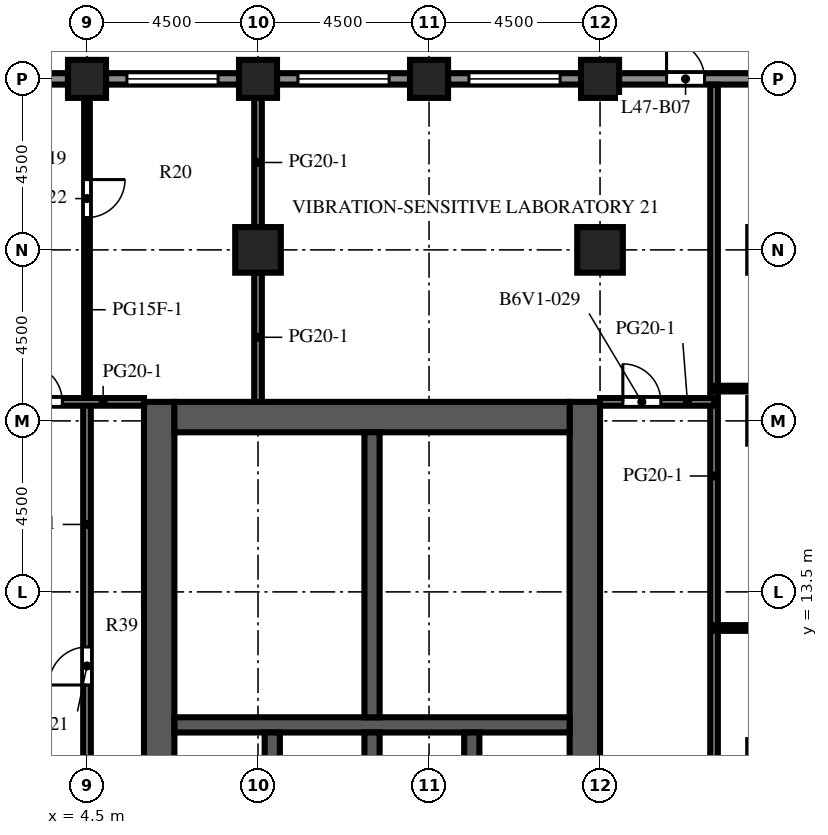
"""IFC4 building model, lengths in metres.
Left out: names, types, materials, properties, quantities, classifications, styles, units other than length and angle.
Written with IfcOpenShell. Run it as: python <this file> out.ifc"""

import sys

from ifc_helpers import new_model, si_unit, direction, frame, frame_2d, origin, origin_2d, place, context, subcontext, project, spatial, rectangle, extrude, element, fill, save


model = new_model("IFC4")
c1 = context("Model", 3, precision=1e-05, world=origin(), true_north=direction((0.0, 1.0)))
c2 = subcontext(c1, "Body", "Model", "MODEL_VIEW")
j1 = project(units=[si_unit("LENGTHUNIT", "METRE"), si_unit("PLANEANGLEUNIT", "RADIAN")], contexts=[c1])
p1 = place(None, origin())
s1 = spatial("IfcSite", under=j1, at=p1, CompositionType="ELEMENT")
p2 = place(p1, origin())
s2 = spatial("IfcBuilding", under=s1, at=p2, CompositionType="ELEMENT")
p3 = place(p2, frame((0.0, 0.0, 207.9)))
s3 = spatial("IfcBuildingStorey", under=s2, at=p3, CompositionType="ELEMENT", Elevation=207.9)
for number, where, z_axis, x_axis in (
    (1, (4.5, 27.0, 0.0), (0.0, 0.0, 1.0), (1.0, 0.0, 0.0)),
    (2, (9.0, 27.0, 0.0), (0.0, 0.0, 1.0), (1.0, 0.0, 0.0)),
    (3, (13.5, 27.0, 0.0), (0.0, 0.0, 1.0), (1.0, 0.0, 0.0)),
    (4, (18.0, 27.0, 0.0), (0.0, 0.0, 1.0), (1.0, 0.0, 0.0)),
):
    element("IfcColumn", number, at=place(p3, frame(where, z_axis=z_axis, x_axis=x_axis)), inside=s3, PredefinedType="COLUMN", context=c2, shape_type="SweptSolid", body=[
        extrude(rectangle(XDim=1.0, YDim=1.0, at=origin_2d()), origin(), (0.0, 0.0, 1.0), 4.1),
    ])
for number, where, z_axis, x_axis in (
    (5, (9.0, 22.5, 0.0), (0.0, 0.0, 1.0), (1.0, 0.0, 0.0)),
    (6, (18.0, 22.5, 0.0), (0.0, 0.0, 1.0), (1.0, 0.0, 0.0)),
):
    element("IfcColumn", number, at=place(p3, frame(where, z_axis=z_axis, x_axis=x_axis)), inside=s3, PredefinedType="COLUMN", context=c2, shape_type="SweptSolid", body=[
        extrude(rectangle(XDim=1.2, YDim=1.2, at=origin_2d()), origin(), (0.0, 0.0, 1.0), 4.1),
    ])
p4 = place(p3, frame((6.4, -9.0, 0.0), z_axis=(0.0, 0.0, 1.0), x_axis=(0.0, 1.0, 0.0)))
e7 = element("IfcWall", 7, at=p4, inside=s3, PredefinedType="SHEAR", context=c2, shape_type="SweptSolid", body=[
    extrude(rectangle(XDim=27.5, YDim=0.8, at=frame_2d((13.75, 0.0))), origin(), (0.0, 0.0, 1.0), 4.1),
])
p5 = place(p4, frame((12.55, 0.0, 0.0)))
e8 = element("IfcOpeningElement", 8, at=p5, cuts=e7, PredefinedType="OPENING", context=c2, shape_type="SweptSolid", body=[
    extrude(rectangle(XDim=2.4, YDim=2.4, at=frame_2d((1.2, 1.2))), frame((0.0, 0.41, 0.0), z_axis=(0.0, -1.0, 0.0), x_axis=(1.0, 0.0, 0.0)), (0.0, 0.0, 1.0), 0.82),
])
p6 = place(p4, frame((3.95, 0.0, 0.0)))
e9 = element("IfcOpeningElement", 9, at=p6, cuts=e7, PredefinedType="OPENING", context=c2, shape_type="SweptSolid", body=[
    extrude(rectangle(XDim=1.2, YDim=2.1, at=frame_2d((0.6, 1.05))), frame((0.0, 0.41, 0.0), z_axis=(0.0, -1.0, 0.0), x_axis=(1.0, 0.0, 0.0)), (0.0, 0.0, 1.0), 0.82),
])
p7 = place(p4, frame((22.35, 0.0, 0.0)))
e10 = element("IfcOpeningElement", 10, at=p7, cuts=e7, PredefinedType="OPENING", context=c2, shape_type="SweptSolid", body=[
    extrude(rectangle(XDim=1.2, YDim=2.1, at=frame_2d((0.6, 1.05))), frame((0.0, 0.41, 0.0), z_axis=(0.0, -1.0, 0.0), x_axis=(1.0, 0.0, 0.0)), (0.0, 0.0, 1.0), 0.82),
])
p8 = place(p3, frame((17.6, -9.0, 0.0), z_axis=(0.0, 0.0, 1.0), x_axis=(0.0, 1.0, 0.0)))
e11 = element("IfcWall", 11, at=p8, inside=s3, PredefinedType="SHEAR", context=c2, shape_type="SweptSolid", body=[
    extrude(rectangle(XDim=27.5, YDim=0.8, at=frame_2d((13.75, 0.0))), origin(), (0.0, 0.0, 1.0), 4.1),
])
p9 = place(p8, frame((12.55, 0.0, 0.0)))
e12 = element("IfcOpeningElement", 12, at=p9, cuts=e11, PredefinedType="OPENING", context=c2, shape_type="SweptSolid", body=[
    extrude(rectangle(XDim=2.4, YDim=2.4, at=frame_2d((1.2, 1.2))), frame((0.0, 0.41, 0.0), z_axis=(0.0, -1.0, 0.0), x_axis=(1.0, 0.0, 0.0)), (0.0, 0.0, 1.0), 0.82),
])
p10 = place(p8, frame((6.825, 0.0, 0.0)))
e13 = element("IfcOpeningElement", 13, at=p10, cuts=e11, PredefinedType="OPENING", context=c2, shape_type="SweptSolid", body=[
    extrude(rectangle(XDim=1.2, YDim=2.1, at=frame_2d((0.6, 1.05))), frame((0.0, 0.41, 0.0), z_axis=(0.0, -1.0, 0.0), x_axis=(1.0, 0.0, 0.0)), (0.0, 0.0, 1.0), 0.82),
])
p11 = place(p8, frame((19.475, 0.0, 0.0)))
e14 = element("IfcOpeningElement", 14, at=p11, cuts=e11, PredefinedType="OPENING", context=c2, shape_type="SweptSolid", body=[
    extrude(rectangle(XDim=1.2, YDim=2.1, at=frame_2d((0.6, 1.05))), frame((0.0, 0.41, 0.0), z_axis=(0.0, -1.0, 0.0), x_axis=(1.0, 0.0, 0.0)), (0.0, 0.0, 1.0), 0.82),
])
p12 = place(p3, frame((6.8, 18.1, 0.0), z_axis=(0.0, 0.0, 1.0), x_axis=(1.0, 0.0, 0.0)))
e15 = element("IfcWall", 15, at=p12, inside=s3, PredefinedType="SHEAR", context=c2, shape_type="SweptSolid", body=[
    extrude(rectangle(XDim=10.4, YDim=0.8, at=frame_2d((5.2, 0.0))), origin(), (0.0, 0.0, 1.0), 4.1),
])
p13 = place(p3, frame((6.8, 10.0, 0.0), z_axis=(0.0, 0.0, 1.0), x_axis=(1.0, 0.0, 0.0)))
e16 = element("IfcWall", 16, at=p13, inside=s3, PredefinedType="SHEAR", context=c2, shape_type="SweptSolid", body=[
    extrude(rectangle(XDim=10.4, YDim=0.4, at=frame_2d((5.2, 0.0))), origin(), (0.0, 0.0, 1.0), 4.1),
])
for number, where, z_axis, x_axis in (
    (17, (9.375, 6.9, 0.0), (0.0, 0.0, 1.0), (0.0, 1.0, 0.0)),
    (18, (12.0, 6.9, 0.0), (0.0, 0.0, 1.0), (0.0, 1.0, 0.0)),
    (19, (14.625, 6.9, 0.0), (0.0, 0.0, 1.0), (0.0, 1.0, 0.0)),
):
    element("IfcWall", number, at=place(p3, frame(where, z_axis=z_axis, x_axis=x_axis)), inside=s3, PredefinedType="SHEAR", context=c2, shape_type="SweptSolid", body=[
        extrude(rectangle(XDim=2.9, YDim=0.4, at=frame_2d((1.45, 0.0))), origin(), (0.0, 0.0, 1.0), 4.1),
    ])
p14 = place(p3, frame((12.0, 10.2, 0.0), z_axis=(0.0, 0.0, 1.0), x_axis=(0.0, 1.0, 0.0)))
e20 = element("IfcWall", 20, at=p14, inside=s3, PredefinedType="SHEAR", context=c2, shape_type="SweptSolid", body=[
    extrude(rectangle(XDim=7.5, YDim=0.4, at=frame_2d((3.75, 0.0))), origin(), (0.0, 0.0, 1.0), 4.1),
])
p15 = place(p3, frame((18.5, 27.0, 0.0), z_axis=(0.0, 0.0, 1.0), x_axis=(1.0, 0.0, 0.0)))
e21 = element("IfcWall", 21, at=p15, inside=s3, PredefinedType="SOLIDWALL", context=c2, shape_type="SweptSolid", body=[
    extrude(rectangle(XDim=3.5, YDim=0.3, at=frame_2d((1.75, 0.0))), origin(), (0.0, 0.0, 1.0), 2.85),
])
p16 = place(p15, frame((1.25, 0.0, 0.0)))
e22 = element("IfcOpeningElement", 22, at=p16, cuts=e21, PredefinedType="OPENING", context=c2, shape_type="SweptSolid", body=[
    extrude(rectangle(XDim=1.0, YDim=2.2, at=frame_2d((0.5, 1.1))), frame((0.0, 0.16, 0.0), z_axis=(0.0, -1.0, 0.0), x_axis=(1.0, 0.0, 0.0)), (0.0, 0.0, 1.0), 0.32),
])
p17 = place(p3, frame((14.0, 27.0, 0.0), z_axis=(0.0, 0.0, 1.0), x_axis=(1.0, 0.0, 0.0)))
e23 = element("IfcWall", 23, at=p17, inside=s3, PredefinedType="SOLIDWALL", context=c2, shape_type="SweptSolid", body=[
    extrude(rectangle(XDim=3.5, YDim=0.3, at=frame_2d((1.75, 0.0))), origin(), (0.0, 0.0, 1.0), 2.85),
])
p18 = place(p17, frame((0.55, 0.0, 0.8)))
e24 = element("IfcOpeningElement", 24, at=p18, cuts=e23, PredefinedType="OPENING", context=c2, shape_type="SweptSolid", body=[
    extrude(rectangle(XDim=2.4, YDim=1.7, at=frame_2d((1.2, 0.85))), frame((0.0, 0.16, 0.0), z_axis=(0.0, -1.0, 0.0), x_axis=(1.0, 0.0, 0.0)), (0.0, 0.0, 1.0), 0.32),
])
p19 = place(p3, frame((9.5, 27.0, 0.0), z_axis=(0.0, 0.0, 1.0), x_axis=(1.0, 0.0, 0.0)))
e25 = element("IfcWall", 25, at=p19, inside=s3, PredefinedType="SOLIDWALL", context=c2, shape_type="SweptSolid", body=[
    extrude(rectangle(XDim=3.5, YDim=0.3, at=frame_2d((1.75, 0.0))), origin(), (0.0, 0.0, 1.0), 2.85),
])
p20 = place(p19, frame((0.55, 0.0, 0.8)))
e26 = element("IfcOpeningElement", 26, at=p20, cuts=e25, PredefinedType="OPENING", context=c2, shape_type="SweptSolid", body=[
    extrude(rectangle(XDim=2.4, YDim=1.7, at=frame_2d((1.2, 0.85))), frame((0.0, 0.16, 0.0), z_axis=(0.0, -1.0, 0.0), x_axis=(1.0, 0.0, 0.0)), (0.0, 0.0, 1.0), 0.32),
])
p21 = place(p3, frame((5.0, 27.0, 0.0), z_axis=(0.0, 0.0, 1.0), x_axis=(1.0, 0.0, 0.0)))
e27 = element("IfcWall", 27, at=p21, inside=s3, PredefinedType="SOLIDWALL", context=c2, shape_type="SweptSolid", body=[
    extrude(rectangle(XDim=3.5, YDim=0.3, at=frame_2d((1.75, 0.0))), origin(), (0.0, 0.0, 1.0), 2.85),
])
p22 = place(p21, frame((0.55, 0.0, 0.8)))
e28 = element("IfcOpeningElement", 28, at=p22, cuts=e27, PredefinedType="OPENING", context=c2, shape_type="SweptSolid", body=[
    extrude(rectangle(XDim=2.4, YDim=1.7, at=frame_2d((1.2, 0.85))), frame((0.0, 0.16, 0.0), z_axis=(0.0, -1.0, 0.0), x_axis=(1.0, 0.0, 0.0)), (0.0, 0.0, 1.0), 0.32),
])
p23 = place(p3, frame((0.5, 27.0, 0.0), z_axis=(0.0, 0.0, 1.0), x_axis=(1.0, 0.0, 0.0)))
e29 = element("IfcWall", 29, at=p23, inside=s3, PredefinedType="SOLIDWALL", context=c2, shape_type="SweptSolid", body=[
    extrude(rectangle(XDim=3.5, YDim=0.3, at=frame_2d((1.75, 0.0))), origin(), (0.0, 0.0, 1.0), 2.85),
])
p24 = place(p23, frame((0.55, 0.0, 0.8)))
e30 = element("IfcOpeningElement", 30, at=p24, cuts=e29, PredefinedType="OPENING", context=c2, shape_type="SweptSolid", body=[
    extrude(rectangle(XDim=2.4, YDim=1.7, at=frame_2d((1.2, 0.85))), frame((0.0, 0.16, 0.0), z_axis=(0.0, -1.0, 0.0), x_axis=(1.0, 0.0, 0.0)), (0.0, 0.0, 1.0), 0.32),
])
p25 = place(p3, frame((8.2, 10.2, 0.0), z_axis=(0.0, 0.0, 1.0), x_axis=(0.0, 1.0, 0.0)))
e31 = element("IfcWall", 31, at=p25, inside=s3, PredefinedType="PARTITIONING", context=c2, shape_type="SweptSolid", body=[
    extrude(rectangle(XDim=2.25, YDim=0.1, at=frame_2d((1.125, 0.0))), origin(), (0.0, 0.0, 1.0), 3.65),
])
p26 = place(p25, frame((0.625, 0.0, 0.0)))
e32 = element("IfcOpeningElement", 32, at=p26, cuts=e31, PredefinedType="OPENING", context=c2, shape_type="SweptSolid", body=[
    extrude(rectangle(XDim=1.0, YDim=2.1, at=frame_2d((0.5, 1.05))), frame((0.0, 0.06, 0.0), z_axis=(0.0, -1.0, 0.0), x_axis=(1.0, 0.0, 0.0)), (0.0, 0.0, 1.0), 0.12),
])
p27 = place(p3, frame((8.2, 12.45, 0.0), z_axis=(0.0, 0.0, 1.0), x_axis=(0.0, 1.0, 0.0)))
e33 = element("IfcWall", 33, at=p27, inside=s3, PredefinedType="PARTITIONING", context=c2, shape_type="SweptSolid", body=[
    extrude(rectangle(XDim=2.4, YDim=0.1, at=frame_2d((1.2, 0.0))), origin(), (0.0, 0.0, 1.0), 3.65),
])
p28 = place(p27, frame((0.7, 0.0, 0.0)))
e34 = element("IfcOpeningElement", 34, at=p28, cuts=e33, PredefinedType="OPENING", context=c2, shape_type="SweptSolid", body=[
    extrude(rectangle(XDim=1.0, YDim=2.1, at=frame_2d((0.5, 1.05))), frame((0.0, 0.06, 0.0), z_axis=(0.0, -1.0, 0.0), x_axis=(1.0, 0.0, 0.0)), (0.0, 0.0, 1.0), 0.12),
])
p29 = place(p3, frame((8.2, 14.85, 0.0), z_axis=(0.0, 0.0, 1.0), x_axis=(0.0, 1.0, 0.0)))
e35 = element("IfcWall", 35, at=p29, inside=s3, PredefinedType="PARTITIONING", context=c2, shape_type="SweptSolid", body=[
    extrude(rectangle(XDim=2.85, YDim=0.1, at=frame_2d((1.425, 0.0))), origin(), (0.0, 0.0, 1.0), 3.65),
])
p30 = place(p29, frame((0.925, 0.0, 0.0)))
e36 = element("IfcOpeningElement", 36, at=p30, cuts=e35, PredefinedType="OPENING", context=c2, shape_type="SweptSolid", body=[
    extrude(rectangle(XDim=1.0, YDim=2.1, at=frame_2d((0.5, 1.05))), frame((0.0, 0.06, 0.0), z_axis=(0.0, -1.0, 0.0), x_axis=(1.0, 0.0, 0.0)), (0.0, 0.0, 1.0), 0.12),
])
for number, where, z_axis, x_axis in (
    (37, (8.2, 12.45, 0.0), (0.0, 0.0, 1.0), (1.0, 0.0, 0.0)),
    (38, (8.2, 14.85, 0.0), (0.0, 0.0, 1.0), (1.0, 0.0, 0.0)),
):
    element("IfcWall", number, at=place(p3, frame(where, z_axis=z_axis, x_axis=x_axis)), inside=s3, PredefinedType="PARTITIONING", context=c2, shape_type="SweptSolid", body=[
        extrude(rectangle(XDim=3.6, YDim=0.1, at=frame_2d((1.8, 0.0))), origin(), (0.0, 0.0, 1.0), 3.65),
    ])
p31 = place(p3, frame((4.5, 26.5, 0.0), z_axis=(0.0, 0.0, 1.0), x_axis=(0.0, -1.0, 0.0)))
e39 = element("IfcWall", 39, at=p31, inside=s3, PredefinedType="PARTITIONING", context=c2, shape_type="SweptSolid", body=[
    extrude(rectangle(XDim=8.0, YDim=0.15, at=frame_2d((4.0, 0.0))), origin(), (0.0, 0.0, 1.0), 3.65),
])
p32 = place(p31, frame((2.15, 0.0, 0.0)))
e40 = element("IfcOpeningElement", 40, at=p32, cuts=e39, PredefinedType="OPENING", context=c2, shape_type="SweptSolid", body=[
    extrude(rectangle(XDim=1.0, YDim=2.1, at=frame_2d((0.5, 1.05))), frame((0.0, 0.085, 0.0), z_axis=(0.0, -1.0, 0.0), x_axis=(1.0, 0.0, 0.0)), (0.0, 0.0, 1.0), 0.17),
])
p33 = place(p3, frame((4.5, 18.5, 0.0), z_axis=(0.0, 0.0, 1.0), x_axis=(0.0, -1.0, 0.0)))
e41 = element("IfcWall", 41, at=p33, inside=s3, PredefinedType="PARTITIONING", context=c2, shape_type="SweptSolid", body=[
    extrude(rectangle(XDim=11.8, YDim=0.2, at=frame_2d((5.9, 0.0))), origin(), (0.0, 0.0, 1.0), 3.65),
])
p34 = place(p33, frame((6.45, 0.0, 0.0)))
e42 = element("IfcOpeningElement", 42, at=p34, cuts=e41, PredefinedType="OPENING", context=c2, shape_type="SweptSolid", body=[
    extrude(rectangle(XDim=1.0, YDim=2.1, at=frame_2d((0.5, 1.05))), frame((0.0, 0.11, 0.0), z_axis=(0.0, -1.0, 0.0), x_axis=(1.0, 0.0, 0.0)), (0.0, 0.0, 1.0), 0.22),
])
for number, where, z_axis, x_axis in (
    (43, (9.0, 18.5, 0.0), (0.0, 0.0, 1.0), (0.0, 1.0, 0.0)),
    (44, (9.0, 23.1, 0.0), (0.0, 0.0, 1.0), (0.0, 1.0, 0.0)),
):
    element("IfcWall", number, at=place(p3, frame(where, z_axis=z_axis, x_axis=x_axis)), inside=s3, PredefinedType="PARTITIONING", context=c2, shape_type="SweptSolid", body=[
        extrude(rectangle(XDim=3.4, YDim=0.2, at=frame_2d((1.7, 0.0))), origin(), (0.0, 0.0, 1.0), 3.65),
    ])
p35 = place(p3, frame((21.0, 6.25, 0.0), z_axis=(0.0, 0.0, 1.0), x_axis=(0.0, 1.0, 0.0)))
e45 = element("IfcWall", 45, at=p35, inside=s3, PredefinedType="PARTITIONING", context=c2, shape_type="SweptSolid", body=[
    extrude(rectangle(XDim=20.6, YDim=0.2, at=frame_2d((10.3, 0.0))), origin(), (0.0, 0.0, 1.0), 3.65),
])
p36 = place(p3, frame((21.0, 12.55, 0.0), z_axis=(0.0, 0.0, 1.0), x_axis=(1.0, 0.0, 0.0)))
e46 = element("IfcWall", 46, at=p36, inside=s3, PredefinedType="PARTITIONING", context=c2, shape_type="SweptSolid", body=[
    extrude(rectangle(XDim=10.35, YDim=0.15, at=frame_2d((5.175, 0.0))), origin(), (0.0, 0.0, 1.0), 3.65),
])
p37 = place(p36, frame((4.6, 0.0, 0.0)))
e47 = element("IfcOpeningElement", 47, at=p37, cuts=e46, PredefinedType="OPENING", context=c2, shape_type="SweptSolid", body=[
    extrude(rectangle(XDim=1.0, YDim=2.1, at=frame_2d((0.5, 1.05))), frame((0.0, 0.085, 0.0), z_axis=(0.0, -1.0, 0.0), x_axis=(1.0, 0.0, 0.0)), (0.0, 0.0, 1.0), 0.17),
])
p38 = place(p3, frame((1.5, 18.5, 0.0), z_axis=(0.0, 0.0, 1.0), x_axis=(1.0, 0.0, 0.0)))
e48 = element("IfcWall", 48, at=p38, inside=s3, PredefinedType="PARTITIONING", context=c2, shape_type="SweptSolid", body=[
    extrude(rectangle(XDim=4.5, YDim=0.2, at=frame_2d((2.25, 0.0))), origin(), (0.0, 0.0, 1.0), 3.65),
])
p39 = place(p38, frame((1.35, 0.0, 0.0)))
e49 = element("IfcOpeningElement", 49, at=p39, cuts=e48, PredefinedType="OPENING", context=c2, shape_type="SweptSolid", body=[
    extrude(rectangle(XDim=1.0, YDim=2.1, at=frame_2d((0.5, 1.05))), frame((0.0, 0.11, 0.0), z_axis=(0.0, -1.0, 0.0), x_axis=(1.0, 0.0, 0.0)), (0.0, 0.0, 1.0), 0.22),
])
p40 = place(p3, frame((18.0, 18.5, 0.0), z_axis=(0.0, 0.0, 1.0), x_axis=(1.0, 0.0, 0.0)))
e50 = element("IfcWall", 50, at=p40, inside=s3, PredefinedType="PARTITIONING", context=c2, shape_type="SweptSolid", body=[
    extrude(rectangle(XDim=3.0, YDim=0.2, at=frame_2d((1.5, 0.0))), origin(), (0.0, 0.0, 1.0), 3.65),
])
p41 = place(p40, frame((0.6, 0.0, 0.0)))
e51 = element("IfcOpeningElement", 51, at=p41, cuts=e50, PredefinedType="OPENING", context=c2, shape_type="SweptSolid", body=[
    extrude(rectangle(XDim=1.0, YDim=2.1, at=frame_2d((0.5, 1.05))), frame((0.0, 0.11, 0.0), z_axis=(0.0, -1.0, 0.0), x_axis=(1.0, 0.0, 0.0)), (0.0, 0.0, 1.0), 0.22),
])
p42 = place(p3, frame((21.0, 18.85, 0.0), z_axis=(0.0, 0.0, 1.0), x_axis=(1.0, 0.0, 0.0)))
e52 = element("IfcWall", 52, at=p42, inside=s3, PredefinedType="PARTITIONING", context=c2, shape_type="SweptSolid", body=[
    extrude(rectangle(XDim=10.35, YDim=0.15, at=frame_2d((5.175, 0.0))), origin(), (0.0, 0.0, 1.0), 3.65),
])
p43 = place(p42, frame((6.85, 0.0, 0.0)))
e53 = element("IfcOpeningElement", 53, at=p43, cuts=e52, PredefinedType="OPENING", context=c2, shape_type="SweptSolid", body=[
    extrude(rectangle(XDim=1.0, YDim=2.1, at=frame_2d((0.5, 1.05))), frame((0.0, 0.085, 0.0), z_axis=(0.0, -1.0, 0.0), x_axis=(1.0, 0.0, 0.0)), (0.0, 0.0, 1.0), 0.17),
])
p44 = place(p16, origin())
e54 = element("IfcDoor", 54, at=p44, inside=s3, OperationType="SINGLE_SWING_LEFT", PredefinedType="DOOR", context=c2, shape_type="SweptSolid", body=[
    extrude(rectangle(XDim=1.0, YDim=2.2, at=frame_2d((0.5, 1.1))), frame((0.0, 0.025, 0.0), z_axis=(0.0, -1.0, 0.0), x_axis=(1.0, 0.0, 0.0)), (0.0, 0.0, 1.0), 0.05),
])
fill(e22, e54)
p45 = place(p18, origin())
e55 = element("IfcWindow", 55, at=p45, inside=s3, PartitioningType="SINGLE_PANEL", PredefinedType="WINDOW", context=c2, shape_type="SweptSolid", body=[
    extrude(rectangle(XDim=2.4, YDim=1.7, at=frame_2d((1.2, 0.85))), frame((0.0, 0.03, 0.0), z_axis=(0.0, -1.0, 0.0), x_axis=(1.0, 0.0, 0.0)), (0.0, 0.0, 1.0), 0.06),
])
fill(e24, e55)
p46 = place(p20, origin())
e56 = element("IfcWindow", 56, at=p46, inside=s3, PartitioningType="SINGLE_PANEL", PredefinedType="WINDOW", context=c2, shape_type="SweptSolid", body=[
    extrude(rectangle(XDim=2.4, YDim=1.7, at=frame_2d((1.2, 0.85))), frame((0.0, 0.03, 0.0), z_axis=(0.0, -1.0, 0.0), x_axis=(1.0, 0.0, 0.0)), (0.0, 0.0, 1.0), 0.06),
])
fill(e26, e56)
p47 = place(p22, origin())
e57 = element("IfcWindow", 57, at=p47, inside=s3, PartitioningType="SINGLE_PANEL", PredefinedType="WINDOW", context=c2, shape_type="SweptSolid", body=[
    extrude(rectangle(XDim=2.4, YDim=1.7, at=frame_2d((1.2, 0.85))), frame((0.0, 0.03, 0.0), z_axis=(0.0, -1.0, 0.0), x_axis=(1.0, 0.0, 0.0)), (0.0, 0.0, 1.0), 0.06),
])
fill(e28, e57)
p48 = place(p11, frame((1.2, 0.0, 0.0), z_axis=(0.0, 0.0, 1.0), x_axis=(-1.0, 0.0, 0.0)))
e58 = element("IfcDoor", 58, at=p48, inside=s3, OperationType="SINGLE_SWING_LEFT", PredefinedType="DOOR", context=c2, shape_type="SweptSolid", body=[
    extrude(rectangle(XDim=1.2, YDim=2.1, at=frame_2d((0.6, 1.05))), frame((0.0, 0.025, 0.0), z_axis=(0.0, -1.0, 0.0), x_axis=(1.0, 0.0, 0.0)), (0.0, 0.0, 1.0), 0.05),
])
fill(e14, e58)
p49 = place(p7, origin())
e59 = element("IfcDoor", 59, at=p49, inside=s3, OperationType="SINGLE_SWING_RIGHT", PredefinedType="DOOR", context=c2, shape_type="SweptSolid", body=[
    extrude(rectangle(XDim=1.2, YDim=2.1, at=frame_2d((0.6, 1.05))), frame((0.0, -0.325, 0.0), z_axis=(0.0, -1.0, 0.0), x_axis=(1.0, 0.0, 0.0)), (0.0, 0.0, 1.0), 0.05),
])
fill(e10, e59)
p50 = place(p26, origin())
e60 = element("IfcDoor", 60, at=p50, inside=s3, OperationType="SINGLE_SWING_LEFT", PredefinedType="DOOR", context=c2, shape_type="SweptSolid", body=[
    extrude(rectangle(XDim=1.0, YDim=2.1, at=frame_2d((0.5, 1.05))), frame((0.0, 0.025, 0.0), z_axis=(0.0, -1.0, 0.0), x_axis=(1.0, 0.0, 0.0)), (0.0, 0.0, 1.0), 0.05),
])
fill(e32, e60)
p51 = place(p28, origin())
e61 = element("IfcDoor", 61, at=p51, inside=s3, OperationType="SINGLE_SWING_RIGHT", PredefinedType="DOOR", context=c2, shape_type="SweptSolid", body=[
    extrude(rectangle(XDim=1.0, YDim=2.1, at=frame_2d((0.5, 1.05))), frame((0.0, 0.025, 0.0), z_axis=(0.0, -1.0, 0.0), x_axis=(1.0, 0.0, 0.0)), (0.0, 0.0, 1.0), 0.05),
])
fill(e34, e61)
p52 = place(p30, origin())
e62 = element("IfcDoor", 62, at=p52, inside=s3, OperationType="SINGLE_SWING_LEFT", PredefinedType="DOOR", context=c2, shape_type="SweptSolid", body=[
    extrude(rectangle(XDim=1.0, YDim=2.1, at=frame_2d((0.5, 1.05))), frame((0.0, 0.025, 0.0), z_axis=(0.0, -1.0, 0.0), x_axis=(1.0, 0.0, 0.0)), (0.0, 0.0, 1.0), 0.05),
])
fill(e36, e62)
p53 = place(p34, origin())
e63 = element("IfcDoor", 63, at=p53, inside=s3, OperationType="SINGLE_SWING_RIGHT", PredefinedType="DOOR", context=c2, shape_type="SweptSolid", body=[
    extrude(rectangle(XDim=1.0, YDim=2.1, at=frame_2d((0.5, 1.05))), frame((0.0, 0.025, 0.0), z_axis=(0.0, -1.0, 0.0), x_axis=(1.0, 0.0, 0.0)), (0.0, 0.0, 1.0), 0.05),
])
fill(e42, e63)
p54 = place(p32, origin())
e64 = element("IfcDoor", 64, at=p54, inside=s3, OperationType="SINGLE_SWING_LEFT", PredefinedType="DOOR", context=c2, shape_type="SweptSolid", body=[
    extrude(rectangle(XDim=1.0, YDim=2.1, at=frame_2d((0.5, 1.05))), frame((0.0, 0.025, 0.0), z_axis=(0.0, -1.0, 0.0), x_axis=(1.0, 0.0, 0.0)), (0.0, 0.0, 1.0), 0.05),
])
fill(e40, e64)
p55 = place(p39, origin())
e65 = element("IfcDoor", 65, at=p55, inside=s3, OperationType="SINGLE_SWING_LEFT", PredefinedType="DOOR", context=c2, shape_type="SweptSolid", body=[
    extrude(rectangle(XDim=1.0, YDim=2.1, at=frame_2d((0.5, 1.05))), frame((0.0, 0.025, 0.0), z_axis=(0.0, -1.0, 0.0), x_axis=(1.0, 0.0, 0.0)), (0.0, 0.0, 1.0), 0.05),
])
fill(e49, e65)
p56 = place(p41, origin())
e66 = element("IfcDoor", 66, at=p56, inside=s3, OperationType="SINGLE_SWING_LEFT", PredefinedType="DOOR", context=c2, shape_type="SweptSolid", body=[
    extrude(rectangle(XDim=1.0, YDim=2.1, at=frame_2d((0.5, 1.05))), frame((0.0, 0.025, 0.0), z_axis=(0.0, -1.0, 0.0), x_axis=(1.0, 0.0, 0.0)), (0.0, 0.0, 1.0), 0.05),
])
fill(e51, e66)
save(model, sys.argv[1])
